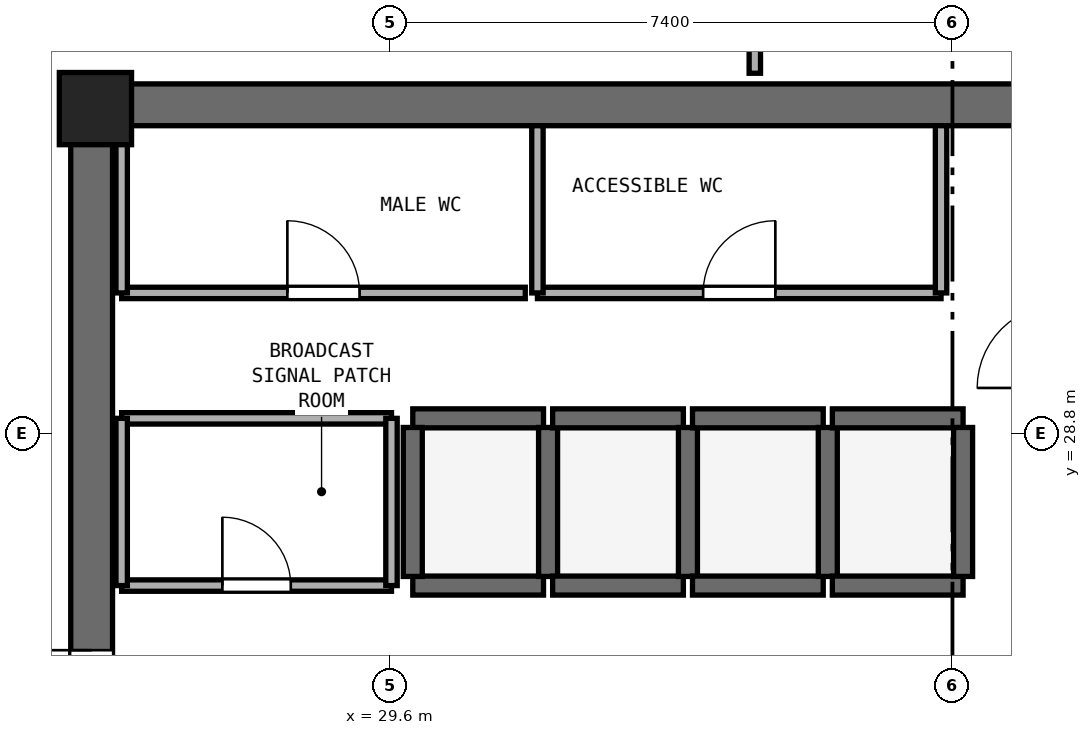
"""IFC4 building model, lengths in metres.
Left out: names, types, materials, properties, quantities, classifications, styles, units other than length and angle.
Written with IfcOpenShell. Run it as: python <this file> out.ifc"""

import sys

from ifc_helpers import new_model, si_unit, direction, frame, frame_2d, origin, origin_2d, place, context, subcontext, project, spatial, rectangle, extrude, element, fill, save


model = new_model("IFC4")
c1 = context("Model", 3, precision=1e-05, world=origin(), true_north=direction((0.0, 1.0)))
c2 = subcontext(c1, "Body", "Model", "MODEL_VIEW")
j1 = project(units=[si_unit("LENGTHUNIT", "METRE"), si_unit("PLANEANGLEUNIT", "RADIAN")], contexts=[c1])
p1 = place(None, origin())
s1 = spatial("IfcSite", under=j1, at=p1, CompositionType="ELEMENT")
p2 = place(p1, origin())
s2 = spatial("IfcBuilding", under=s1, at=p2, CompositionType="ELEMENT")
p3 = place(p2, frame((0.0, 0.0, 182.0)))
s3 = spatial("IfcBuildingStorey", under=s2, at=p3, CompositionType="ELEMENT", Elevation=182.0)
p4 = place(p3, frame((25.4, 33.125, 0.0), z_axis=(0.0, 0.0, 1.0), x_axis=(1.0, 0.0, 0.0)))
e1 = element("IfcWall", 1, at=p4, inside=s3, PredefinedType="SHEAR", context=c2, shape_type="SweptSolid", body=[
    extrude(rectangle(XDim=23.2, YDim=0.55, at=frame_2d((11.6, 0.0))), origin(), (0.0, 0.0, 1.0), 3.54),
])
p5 = place(p3, frame((25.675, 17.55, 0.0), z_axis=(0.0, 0.0, 1.0), x_axis=(0.0, 1.0, 0.0)))
e2 = element("IfcWall", 2, at=p5, inside=s3, PredefinedType="SHEAR", context=c2, shape_type="SweptSolid", body=[
    extrude(rectangle(XDim=15.3, YDim=0.55, at=frame_2d((7.65, 0.0))), origin(), (0.0, 0.0, 1.0), 3.54),
])
p6 = place(p5, frame((6.9, 0.0, 0.0)))
e3 = element("IfcOpeningElement", 3, at=p6, cuts=e2, PredefinedType="OPENING", context=c2, shape_type="SweptSolid", body=[
    extrude(rectangle(XDim=1.5, YDim=2.15, at=frame_2d((0.75, 1.075))), frame((0.0, 0.285, 0.0), z_axis=(0.0, -1.0, 0.0), x_axis=(1.0, 0.0, 0.0)), (0.0, 0.0, 1.0), 0.57),
])
p7 = place(p3, frame((25.725, 33.075, 0.0), z_axis=(0.0, 0.0, 1.0), x_axis=(1.0, 0.0, 0.0)))
e4 = element("IfcColumn", 4, at=p7, inside=s3, PredefinedType="PILASTER", context=c2, shape_type="SweptSolid", body=[
    extrude(rectangle(XDim=0.95, YDim=0.95, at=origin_2d()), origin(), (0.0, 0.0, 1.0), 3.8),
])
for number, where, z_axis, x_axis in (
    (5, (29.9, 26.8, 0.0), (0.0, 0.0, 1.0), (1.0, 0.0, 0.0)),
    (6, (29.9, 29.0, 0.0), (0.0, 0.0, 1.0), (1.0, 0.0, 0.0)),
):
    element("IfcWall", number, at=place(p3, frame(where, z_axis=z_axis, x_axis=x_axis)), inside=s3, PredefinedType="SHEAR", context=c2, shape_type="SweptSolid", body=[
        extrude(rectangle(XDim=1.72, YDim=0.25, at=frame_2d((0.86, 0.0))), origin(), (0.0, 0.0, 1.0), 3.54),
    ])
for number, where, z_axis, x_axis in (
    (7, (29.9, 26.92, 0.0), (0.0, 0.0, 1.0), (0.0, 1.0, 0.0)),
    (8, (31.68, 26.92, 0.0), (0.0, 0.0, 1.0), (0.0, 1.0, 0.0)),
):
    element("IfcWall", number, at=place(p3, frame(where, z_axis=z_axis, x_axis=x_axis)), inside=s3, PredefinedType="SHEAR", context=c2, shape_type="SweptSolid", body=[
        extrude(rectangle(XDim=1.96, YDim=0.25, at=frame_2d((0.98, 0.0))), origin(), (0.0, 0.0, 1.0), 3.54),
    ])
for number, where, z_axis, x_axis in (
    (9, (31.74, 26.8, 0.0), (0.0, 0.0, 1.0), (1.0, 0.0, 0.0)),
    (10, (31.74, 29.0, 0.0), (0.0, 0.0, 1.0), (1.0, 0.0, 0.0)),
):
    element("IfcWall", number, at=place(p3, frame(where, z_axis=z_axis, x_axis=x_axis)), inside=s3, PredefinedType="SHEAR", context=c2, shape_type="SweptSolid", body=[
        extrude(rectangle(XDim=1.72, YDim=0.25, at=frame_2d((0.86, 0.0))), origin(), (0.0, 0.0, 1.0), 3.54),
    ])
p8 = place(p3, frame((33.52, 26.92, 0.0), z_axis=(0.0, 0.0, 1.0), x_axis=(0.0, 1.0, 0.0)))
e11 = element("IfcWall", 11, at=p8, inside=s3, PredefinedType="SHEAR", context=c2, shape_type="SweptSolid", body=[
    extrude(rectangle(XDim=1.96, YDim=0.25, at=frame_2d((0.98, 0.0))), origin(), (0.0, 0.0, 1.0), 3.54),
])
for number, where, z_axis, x_axis in (
    (12, (33.58, 26.8, 0.0), (0.0, 0.0, 1.0), (1.0, 0.0, 0.0)),
    (13, (33.58, 29.0, 0.0), (0.0, 0.0, 1.0), (1.0, 0.0, 0.0)),
):
    element("IfcWall", number, at=place(p3, frame(where, z_axis=z_axis, x_axis=x_axis)), inside=s3, PredefinedType="SHEAR", context=c2, shape_type="SweptSolid", body=[
        extrude(rectangle(XDim=1.72, YDim=0.25, at=frame_2d((0.86, 0.0))), origin(), (0.0, 0.0, 1.0), 3.54),
    ])
p9 = place(p3, frame((35.36, 26.92, 0.0), z_axis=(0.0, 0.0, 1.0), x_axis=(0.0, 1.0, 0.0)))
e14 = element("IfcWall", 14, at=p9, inside=s3, PredefinedType="SHEAR", context=c2, shape_type="SweptSolid", body=[
    extrude(rectangle(XDim=1.96, YDim=0.25, at=frame_2d((0.98, 0.0))), origin(), (0.0, 0.0, 1.0), 3.54),
])
for number, where, z_axis, x_axis in (
    (15, (35.42, 26.8, 0.0), (0.0, 0.0, 1.0), (1.0, 0.0, 0.0)),
    (16, (35.42, 29.0, 0.0), (0.0, 0.0, 1.0), (1.0, 0.0, 0.0)),
):
    element("IfcWall", number, at=place(p3, frame(where, z_axis=z_axis, x_axis=x_axis)), inside=s3, PredefinedType="SHEAR", context=c2, shape_type="SweptSolid", body=[
        extrude(rectangle(XDim=1.72, YDim=0.25, at=frame_2d((0.86, 0.0))), origin(), (0.0, 0.0, 1.0), 3.54),
    ])
p10 = place(p3, frame((37.14, 26.92, 0.0), z_axis=(0.0, 0.0, 1.0), x_axis=(0.0, 1.0, 0.0)))
e17 = element("IfcWall", 17, at=p10, inside=s3, PredefinedType="SHEAR", context=c2, shape_type="SweptSolid", body=[
    extrude(rectangle(XDim=1.96, YDim=0.25, at=frame_2d((0.98, 0.0))), origin(), (0.0, 0.0, 1.0), 3.54),
])
p11 = place(p3, frame((26.07, 30.65, 0.0), z_axis=(0.0, 0.0, 1.0), x_axis=(1.0, 0.0, 0.0)))
e18 = element("IfcWall", 18, at=p11, inside=s3, PredefinedType="PARTITIONING", context=c2, shape_type="SweptSolid", body=[
    extrude(rectangle(XDim=5.31, YDim=0.15, at=frame_2d((2.655, 0.0))), origin(), (0.0, 0.0, 1.0), 3.54),
])
p12 = place(p11, frame((2.18, 0.0, 0.0)))
e19 = element("IfcOpeningElement", 19, at=p12, cuts=e18, PredefinedType="OPENING", context=c2, shape_type="SweptSolid", body=[
    extrude(rectangle(XDim=0.95, YDim=2.1, at=frame_2d((0.475, 1.05))), frame((0.0, 0.085, 0.0), z_axis=(0.0, -1.0, 0.0), x_axis=(1.0, 0.0, 0.0)), (0.0, 0.0, 1.0), 0.17),
])
p13 = place(p3, frame((26.07, 30.65, 0.0), z_axis=(0.0, 0.0, 1.0), x_axis=(0.0, 1.0, 0.0)))
e20 = element("IfcWall", 20, at=p13, inside=s3, PredefinedType="PARTITIONING", context=c2, shape_type="SweptSolid", body=[
    extrude(rectangle(XDim=2.2, YDim=0.15, at=frame_2d((1.1, 0.0))), origin(), (0.0, 0.0, 1.0), 2.64),
])
p14 = place(p3, frame((31.54, 30.65, 0.0), z_axis=(0.0, 0.0, 1.0), x_axis=(1.0, 0.0, 0.0)))
e21 = element("IfcWall", 21, at=p14, inside=s3, PredefinedType="PARTITIONING", context=c2, shape_type="SweptSolid", body=[
    extrude(rectangle(XDim=5.31, YDim=0.15, at=frame_2d((2.655, 0.0))), origin(), (0.0, 0.0, 1.0), 3.54),
])
p15 = place(p14, frame((2.18, 0.0, 0.0)))
e22 = element("IfcOpeningElement", 22, at=p15, cuts=e21, PredefinedType="OPENING", context=c2, shape_type="SweptSolid", body=[
    extrude(rectangle(XDim=0.95, YDim=2.1, at=frame_2d((0.475, 1.05))), frame((0.0, 0.085, 0.0), z_axis=(0.0, -1.0, 0.0), x_axis=(1.0, 0.0, 0.0)), (0.0, 0.0, 1.0), 0.17),
])
for number, where, z_axis, x_axis in (
    (23, (31.54, 30.65, 0.0), (0.0, 0.0, 1.0), (0.0, 1.0, 0.0)),
    (24, (36.85, 30.65, 0.0), (0.0, 0.0, 1.0), (0.0, 1.0, 0.0)),
):
    element("IfcWall", number, at=place(p3, frame(where, z_axis=z_axis, x_axis=x_axis)), inside=s3, PredefinedType="PARTITIONING", context=c2, shape_type="SweptSolid", body=[
        extrude(rectangle(XDim=2.2, YDim=0.15, at=frame_2d((1.1, 0.0))), origin(), (0.0, 0.0, 1.0), 3.54),
    ])
p16 = place(p3, frame((26.07, 26.8, 0.0), z_axis=(0.0, 0.0, 1.0), x_axis=(1.0, 0.0, 0.0)))
e25 = element("IfcWall", 25, at=p16, inside=s3, PredefinedType="PARTITIONING", context=c2, shape_type="SweptSolid", body=[
    extrude(rectangle(XDim=3.55, YDim=0.15, at=frame_2d((1.775, 0.0))), origin(), (0.0, 0.0, 1.0), 3.54),
])
p17 = place(p16, frame((1.325, 0.0, 0.0)))
e26 = element("IfcOpeningElement", 26, at=p17, cuts=e25, PredefinedType="OPENING", context=c2, shape_type="SweptSolid", body=[
    extrude(rectangle(XDim=0.9, YDim=2.1, at=frame_2d((0.45, 1.05))), frame((0.0, 0.085, 0.0), z_axis=(0.0, -1.0, 0.0), x_axis=(1.0, 0.0, 0.0)), (0.0, 0.0, 1.0), 0.17),
])
p18 = place(p3, frame((26.07, 29.0, 0.0), z_axis=(0.0, 0.0, 1.0), x_axis=(1.0, 0.0, 0.0)))
e27 = element("IfcWall", 27, at=p18, inside=s3, PredefinedType="PARTITIONING", context=c2, shape_type="SweptSolid", body=[
    extrude(rectangle(XDim=3.55, YDim=0.15, at=frame_2d((1.775, 0.0))), origin(), (0.0, 0.0, 1.0), 3.54),
])
p19 = place(p3, frame((26.07, 26.8, 0.0), z_axis=(0.0, 0.0, 1.0), x_axis=(0.0, 1.0, 0.0)))
e28 = element("IfcWall", 28, at=p19, inside=s3, PredefinedType="PARTITIONING", context=c2, shape_type="SweptSolid", body=[
    extrude(rectangle(XDim=2.2, YDim=0.15, at=frame_2d((1.1, 0.0))), origin(), (0.0, 0.0, 1.0), 2.64),
])
p20 = place(p3, frame((29.62, 26.8, 0.0), z_axis=(0.0, 0.0, 1.0), x_axis=(0.0, 1.0, 0.0)))
e29 = element("IfcWall", 29, at=p20, inside=s3, PredefinedType="PARTITIONING", context=c2, shape_type="SweptSolid", body=[
    extrude(rectangle(XDim=2.2, YDim=0.15, at=frame_2d((1.1, 0.0))), origin(), (0.0, 0.0, 1.0), 3.54),
])
p21 = place(p3, frame((34.4, 33.54, 0.0), z_axis=(0.0, 0.0, 1.0), x_axis=(0.0, 1.0, 0.0)))
e30 = element("IfcWall", 30, at=p21, inside=s3, PredefinedType="PARTITIONING", context=c2, shape_type="SweptSolid", body=[
    extrude(rectangle(XDim=3.71, YDim=0.15, at=frame_2d((1.855, 0.0))), origin(), (0.0, 0.0, 1.0), 3.54),
])
p22 = place(p21, frame((1.355, 0.0, 0.0)))
e31 = element("IfcOpeningElement", 31, at=p22, cuts=e30, PredefinedType="OPENING", context=c2, shape_type="SweptSolid", body=[
    extrude(rectangle(XDim=1.0, YDim=2.12, at=frame_2d((0.5, 1.06))), frame((0.0, 0.085, 0.0), z_axis=(0.0, -1.0, 0.0), x_axis=(1.0, 0.0, 0.0)), (0.0, 0.0, 1.0), 0.17),
])
p23 = place(p6, origin())
e32 = element("IfcDoor", 32, at=p23, inside=s3, OperationType="DOUBLE_DOOR_SINGLE_SWING", PredefinedType="DOOR", context=c2, shape_type="SweptSolid", body=[
    extrude(rectangle(XDim=1.5, YDim=2.15, at=frame_2d((0.75, 1.075))), frame((0.0, 0.025, 0.0), z_axis=(0.0, -1.0, 0.0), x_axis=(1.0, 0.0, 0.0)), (0.0, 0.0, 1.0), 0.05),
])
fill(e3, e32)
p24 = place(p12, origin())
e33 = element("IfcDoor", 33, at=p24, inside=s3, OperationType="SINGLE_SWING_LEFT", PredefinedType="DOOR", context=c2, shape_type="SweptSolid", body=[
    extrude(rectangle(XDim=0.95, YDim=2.1, at=frame_2d((0.475, 1.05))), frame((0.0, 0.025, 0.0), z_axis=(0.0, -1.0, 0.0), x_axis=(1.0, 0.0, 0.0)), (0.0, 0.0, 1.0), 0.05),
])
fill(e19, e33)
p25 = place(p15, origin())
e34 = element("IfcDoor", 34, at=p25, inside=s3, OperationType="SINGLE_SWING_RIGHT", PredefinedType="DOOR", context=c2, shape_type="SweptSolid", body=[
    extrude(rectangle(XDim=0.95, YDim=2.1, at=frame_2d((0.475, 1.05))), frame((0.0, 0.025, 0.0), z_axis=(0.0, -1.0, 0.0), x_axis=(1.0, 0.0, 0.0)), (0.0, 0.0, 1.0), 0.05),
])
fill(e22, e34)
p26 = place(p17, origin())
e35 = element("IfcDoor", 35, at=p26, inside=s3, OperationType="SINGLE_SWING_LEFT", PredefinedType="DOOR", context=c2, shape_type="SweptSolid", body=[
    extrude(rectangle(XDim=0.9, YDim=2.1, at=frame_2d((0.45, 1.05))), frame((0.0, 0.025, 0.0), z_axis=(0.0, -1.0, 0.0), x_axis=(1.0, 0.0, 0.0)), (0.0, 0.0, 1.0), 0.05),
])
fill(e26, e35)
save(model, sys.argv[1])
